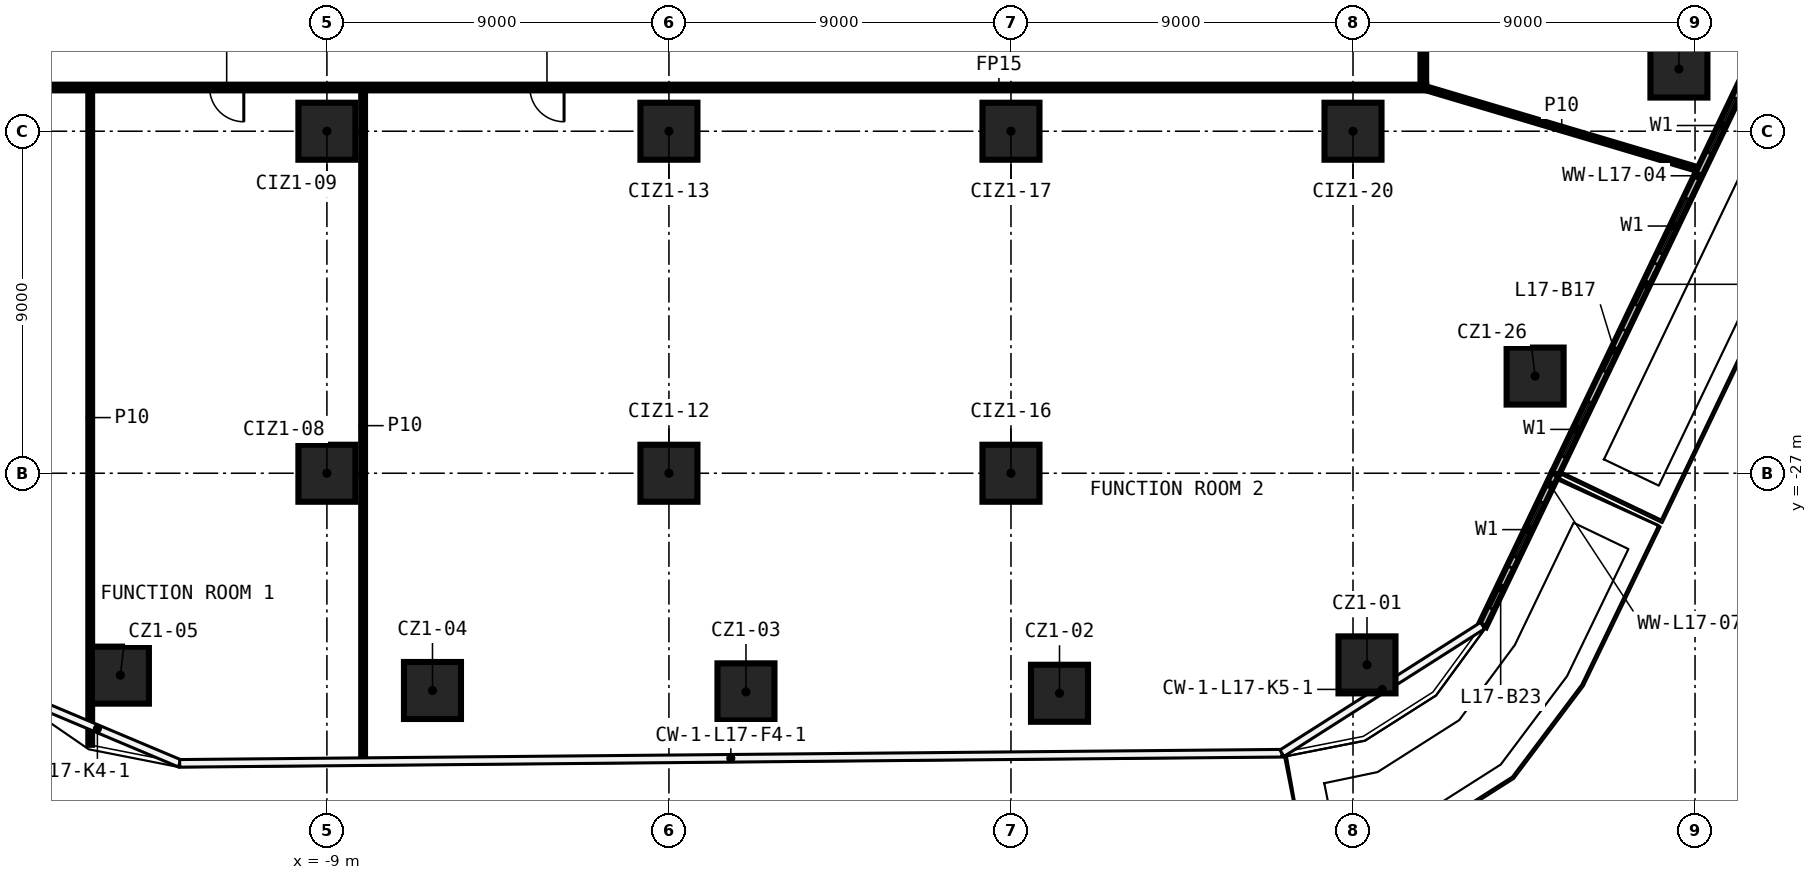
"""IFC4 building model, lengths in metres.
Left out: names, types, materials, properties, quantities, classifications, styles, units other than length and angle.
Written with IfcOpenShell. Run it as: python <this file> out.ifc"""

import sys

from ifc_helpers import new_model, si_unit, direction, frame, frame_2d, origin, origin_2d, place, context, subcontext, project, spatial, rectangle, extrude, element, fill, save


model = new_model("IFC4")
c1 = context("Model", 3, precision=1e-05, world=origin(), true_north=direction((0.0, 1.0)))
c2 = subcontext(c1, "Body", "Model", "MODEL_VIEW")
j1 = project(units=[si_unit("LENGTHUNIT", "METRE"), si_unit("PLANEANGLEUNIT", "RADIAN")], contexts=[c1])
p1 = place(None, origin())
s1 = spatial("IfcSite", under=j1, at=p1, CompositionType="ELEMENT")
p2 = place(p1, origin())
s2 = spatial("IfcBuilding", under=s1, at=p2, CompositionType="ELEMENT")
p3 = place(p2, frame((0.0, 0.0, 84.7)))
s3 = spatial("IfcBuildingStorey", under=s2, at=p3, CompositionType="ELEMENT", Elevation=84.7)
for number, where, z_axis, x_axis in (
    (1, (18.368, -32.043, 0.0), (0.0, 0.0, 1.0), (1.0, 0.0, 0.0)),
    (2, (10.277, -32.79, 0.0), (0.0, 0.0, 1.0), (1.0, 0.0, 0.0)),
    (3, (2.027, -32.753, 0.0), (0.0, 0.0, 1.0), (1.0, 0.0, 0.0)),
    (4, (-6.222, -32.717, 0.0), (0.0, 0.0, 1.0), (1.0, 0.0, 0.0)),
    (5, (-14.434, -32.313, 0.0), (0.0, 0.0, 1.0), (1.0, 0.0, 0.0)),
    (6, (26.576, -16.364, 0.0), (0.0, 0.0, 1.0), (1.0, 0.0, 0.0)),
    (7, (22.792, -24.443, 0.0), (0.0, 0.0, 1.0), (1.0, 0.0, 0.0)),
    (8, (-9.0, -27.0, 0.0), (0.0, 0.0, 1.0), (1.0, 0.0, 0.0)),
    (9, (-9.0, -18.0, 0.0), (0.0, 0.0, 1.0), (1.0, 0.0, 0.0)),
    (10, (0.0, -27.0, 0.0), (0.0, 0.0, 1.0), (1.0, 0.0, 0.0)),
    (11, (0.0, -18.0, 0.0), (0.0, 0.0, 1.0), (1.0, 0.0, 0.0)),
    (12, (9.0, -27.0, 0.0), (0.0, 0.0, 1.0), (1.0, 0.0, 0.0)),
    (13, (9.0, -18.0, 0.0), (0.0, 0.0, 1.0), (1.0, 0.0, 0.0)),
    (14, (18.0, -18.0, 0.0), (0.0, 0.0, 1.0), (1.0, 0.0, 0.0)),
):
    element("IfcColumn", number, at=place(p3, frame(where, z_axis=z_axis, x_axis=x_axis)), inside=s3, PredefinedType="COLUMN", context=c2, shape_type="SweptSolid", body=[
        extrude(rectangle(XDim=1.5, YDim=1.5, at=origin_2d()), origin(), (0.0, 0.0, 1.0), 3.9),
    ])
p4 = place(p3, frame((19.925, -16.85, 0.0), z_axis=(0.0, 0.0, 1.0), x_axis=(-1.0, 0.0, 0.0)))
e15 = element("IfcWall", 15, at=p4, inside=s3, PredefinedType="PARTITIONING", context=c2, shape_type="SweptSolid", body=[
    extrude(rectangle(XDim=39.85, YDim=0.15, at=frame_2d((19.925, 0.0))), origin(), (0.0, 0.0, 1.0), 3.9),
])
p5 = place(p4, frame((31.112, 0.0, 0.0)))
e16 = element("IfcOpeningElement", 16, at=p5, cuts=e15, PredefinedType="OPENING", context=c2, shape_type="SweptSolid", body=[
    extrude(rectangle(XDim=0.9, YDim=2.1, at=frame_2d((0.45, 1.05))), frame((0.0, 0.085, 0.0), z_axis=(0.0, -1.0, 0.0), x_axis=(1.0, 0.0, 0.0)), (0.0, 0.0, 1.0), 0.17),
])
p6 = place(p4, frame((22.684, 0.0, 0.0)))
e17 = element("IfcOpeningElement", 17, at=p6, cuts=e15, PredefinedType="OPENING", context=c2, shape_type="SweptSolid", body=[
    extrude(rectangle(XDim=0.9, YDim=2.1, at=frame_2d((0.45, 1.05))), frame((0.0, 0.085, 0.0), z_axis=(0.0, -1.0, 0.0), x_axis=(1.0, 0.0, 0.0)), (0.0, 0.0, 1.0), 0.17),
])
p7 = place(p3, frame((19.85, 16.775, 0.0), z_axis=(0.0, 0.0, 1.0), x_axis=(0.0, -1.0, 0.0)))
e18 = element("IfcWall", 18, at=p7, inside=s3, PredefinedType="PARTITIONING", context=c2, shape_type="SweptSolid", body=[
    extrude(rectangle(XDim=33.55, YDim=0.15, at=frame_2d((16.775, 0.0))), origin(), (0.0, 0.0, 1.0), 3.9),
])
p8 = place(p7, frame((30.262, 0.0, 0.0)))
e19 = element("IfcOpeningElement", 19, at=p8, cuts=e18, PredefinedType="OPENING", context=c2, shape_type="SweptSolid", body=[
    extrude(rectangle(XDim=0.9, YDim=2.1, at=frame_2d((0.45, 1.05))), frame((0.0, 0.085, 0.0), z_axis=(0.0, -1.0, 0.0), x_axis=(1.0, 0.0, 0.0)), (0.0, 0.0, 1.0), 0.17),
])
p9 = place(p7, frame((21.352, 0.0, 0.0)))
e20 = element("IfcOpeningElement", 20, at=p9, cuts=e18, PredefinedType="OPENING", context=c2, shape_type="SweptSolid", body=[
    extrude(rectangle(XDim=0.9, YDim=2.1, at=frame_2d((0.45, 1.05))), frame((0.0, 0.085, 0.0), z_axis=(0.0, -1.0, 0.0), x_axis=(1.0, 0.0, 0.0)), (0.0, 0.0, 1.0), 0.17),
])
p10 = place(p3, frame((-8.047, -34.57, 0.0), z_axis=(0.0, 0.0, 1.0), x_axis=(0.0, 1.0, 0.0)))
e21 = element("IfcWall", 21, at=p10, inside=s3, PredefinedType="PARTITIONING", context=c2, shape_type="SweptSolid", body=[
    extrude(rectangle(XDim=17.645, YDim=0.1, at=frame_2d((8.823, 0.0))), origin(), (0.0, 0.0, 1.0), 3.9),
])
p11 = place(p3, frame((-15.228, -34.146, 0.0), z_axis=(0.0, 0.0, 1.0), x_axis=(0.0, 1.0, 0.0)))
e22 = element("IfcWall", 22, at=p11, inside=s3, PredefinedType="PARTITIONING", context=c2, shape_type="SweptSolid", body=[
    extrude(rectangle(XDim=17.221, YDim=0.1, at=frame_2d((8.61, 0.0))), origin(), (0.0, 0.0, 1.0), 3.9),
])
p12 = place(p3, frame((19.85, -16.85, 0.0), z_axis=(0.0, 0.0, 1.0), x_axis=(0.958526393987, -0.285003775467, 0.0)))
e23 = element("IfcWall", 23, at=p12, inside=s3, PredefinedType="PARTITIONING", context=c2, shape_type="SweptSolid", body=[
    extrude(rectangle(XDim=7.599, YDim=0.1, at=frame_2d((3.8, 0.0))), origin(), (0.0, 0.0, 1.0), 3.9),
])
p13 = place(p3, frame((23.322, -27.019, 0.0), z_axis=(0.0, 0.0, 1.0), x_axis=(0.432099655508, 0.901825863296, 0.0)))
e24 = element("IfcWall", 24, at=p13, inside=s3, PredefinedType="SOLIDWALL", context=c2, shape_type="SweptSolid", body=[
    extrude(rectangle(XDim=26.603, YDim=0.2, at=frame_2d((13.302, 0.0))), origin(), (0.0, 0.0, 1.0), 3.9),
])
p14 = place(p13, frame((0.5, 0.0, 0.6)))
e25 = element("IfcOpeningElement", 25, at=p14, cuts=e24, PredefinedType="OPENING", context=c2, shape_type="SweptSolid", body=[
    extrude(rectangle(XDim=1.6, YDim=2.4, at=frame_2d((0.8, 1.2))), frame((0.0, 0.11, 0.0), z_axis=(0.0, -1.0, 0.0), x_axis=(1.0, 0.0, 0.0)), (0.0, 0.0, 1.0), 0.22),
])
p15 = place(p13, frame((3.0, 0.0, 0.0)))
e26 = element("IfcOpeningElement", 26, at=p15, cuts=e24, PredefinedType="OPENING", context=c2, shape_type="SweptSolid", body=[
    extrude(rectangle(XDim=1.2, YDim=2.4, at=frame_2d((0.6, 1.2))), frame((0.0, 0.11, 0.0), z_axis=(0.0, -1.0, 0.0), x_axis=(1.0, 0.0, 0.0)), (0.0, 0.0, 1.0), 0.22),
])
p16 = place(p13, frame((6.434, 0.0, 0.6)))
e27 = element("IfcOpeningElement", 27, at=p16, cuts=e24, PredefinedType="OPENING", context=c2, shape_type="SweptSolid", body=[
    extrude(rectangle(XDim=1.6, YDim=2.4, at=frame_2d((0.8, 1.2))), frame((0.0, 0.11, 0.0), z_axis=(0.0, -1.0, 0.0), x_axis=(1.0, 0.0, 0.0)), (0.0, 0.0, 1.0), 0.22),
])
p17 = place(p13, frame((4.934, 0.0, 0.0)))
e28 = element("IfcOpeningElement", 28, at=p17, cuts=e24, PredefinedType="OPENING", context=c2, shape_type="SweptSolid", body=[
    extrude(rectangle(XDim=1.2, YDim=2.4, at=frame_2d((0.6, 1.2))), frame((0.0, 0.11, 0.0), z_axis=(0.0, -1.0, 0.0), x_axis=(1.0, 0.0, 0.0)), (0.0, 0.0, 1.0), 0.22),
])
p18 = place(p13, frame((9.368, 0.0, 0.6)))
e29 = element("IfcOpeningElement", 29, at=p18, cuts=e24, PredefinedType="OPENING", context=c2, shape_type="SweptSolid", body=[
    extrude(rectangle(XDim=1.6, YDim=2.4, at=frame_2d((0.8, 1.2))), frame((0.0, 0.11, 0.0), z_axis=(0.0, -1.0, 0.0), x_axis=(1.0, 0.0, 0.0)), (0.0, 0.0, 1.0), 0.22),
])
p19 = place(p13, frame((11.868, 0.0, 0.0)))
e30 = element("IfcOpeningElement", 30, at=p19, cuts=e24, PredefinedType="OPENING", context=c2, shape_type="SweptSolid", body=[
    extrude(rectangle(XDim=1.2, YDim=2.4, at=frame_2d((0.6, 1.2))), frame((0.0, 0.11, 0.0), z_axis=(0.0, -1.0, 0.0), x_axis=(1.0, 0.0, 0.0)), (0.0, 0.0, 1.0), 0.22),
])
p20 = place(p13, frame((15.301, 0.0, 0.6)))
e31 = element("IfcOpeningElement", 31, at=p20, cuts=e24, PredefinedType="OPENING", context=c2, shape_type="SweptSolid", body=[
    extrude(rectangle(XDim=1.6, YDim=2.4, at=frame_2d((0.8, 1.2))), frame((0.0, 0.11, 0.0), z_axis=(0.0, -1.0, 0.0), x_axis=(1.0, 0.0, 0.0)), (0.0, 0.0, 1.0), 0.22),
])
p21 = place(p13, frame((13.801, 0.0, 0.0)))
e32 = element("IfcOpeningElement", 32, at=p21, cuts=e24, PredefinedType="OPENING", context=c2, shape_type="SweptSolid", body=[
    extrude(rectangle(XDim=1.2, YDim=2.4, at=frame_2d((0.6, 1.2))), frame((0.0, 0.11, 0.0), z_axis=(0.0, -1.0, 0.0), x_axis=(1.0, 0.0, 0.0)), (0.0, 0.0, 1.0), 0.22),
])
p22 = place(p13, frame((19.735, 0.0, 0.6)))
e33 = element("IfcOpeningElement", 33, at=p22, cuts=e24, PredefinedType="OPENING", context=c2, shape_type="SweptSolid", body=[
    extrude(rectangle(XDim=1.6, YDim=2.4, at=frame_2d((0.8, 1.2))), frame((0.0, 0.11, 0.0), z_axis=(0.0, -1.0, 0.0), x_axis=(1.0, 0.0, 0.0)), (0.0, 0.0, 1.0), 0.22),
])
p23 = place(p13, frame((18.035, 0.0, 0.0)))
e34 = element("IfcOpeningElement", 34, at=p23, cuts=e24, PredefinedType="OPENING", context=c2, shape_type="SweptSolid", body=[
    extrude(rectangle(XDim=1.2, YDim=2.4, at=frame_2d((0.6, 1.2))), frame((0.0, 0.11, 0.0), z_axis=(0.0, -1.0, 0.0), x_axis=(1.0, 0.0, 0.0)), (0.0, 0.0, 1.0), 0.22),
])
p24 = place(p13, frame((24.169, 0.0, 0.6)))
e35 = element("IfcOpeningElement", 35, at=p24, cuts=e24, PredefinedType="OPENING", context=c2, shape_type="SweptSolid", body=[
    extrude(rectangle(XDim=1.6, YDim=2.4, at=frame_2d((0.8, 1.2))), frame((0.0, 0.11, 0.0), z_axis=(0.0, -1.0, 0.0), x_axis=(1.0, 0.0, 0.0)), (0.0, 0.0, 1.0), 0.22),
])
p25 = place(p13, frame((22.669, 0.0, 0.0)))
e36 = element("IfcOpeningElement", 36, at=p25, cuts=e24, PredefinedType="OPENING", context=c2, shape_type="SweptSolid", body=[
    extrude(rectangle(XDim=1.2, YDim=2.4, at=frame_2d((0.6, 1.2))), frame((0.0, 0.11, 0.0), z_axis=(0.0, -1.0, 0.0), x_axis=(1.0, 0.0, 0.0)), (0.0, 0.0, 1.0), 0.22),
])
p26 = place(p3, frame((21.41, -31.009, 0.0), z_axis=(0.0, 0.0, 1.0), x_axis=(0.432074367005, 0.90183797956, 0.0)))
e37 = element("IfcWall", 37, at=p26, inside=s3, PredefinedType="SOLIDWALL", context=c2, shape_type="SweptSolid", body=[
    extrude(rectangle(XDim=4.424, YDim=0.2, at=frame_2d((2.212, 0.0))), origin(), (0.0, 0.0, 1.0), 3.9),
])
p27 = place(p26, frame((2.0, 0.0, 0.6)))
e38 = element("IfcOpeningElement", 38, at=p27, cuts=e37, PredefinedType="OPENING", context=c2, shape_type="SweptSolid", body=[
    extrude(rectangle(XDim=1.6, YDim=2.4, at=frame_2d((0.8, 1.2))), frame((0.0, 0.11, 0.0), z_axis=(0.0, -1.0, 0.0), x_axis=(1.0, 0.0, 0.0)), (0.0, 0.0, 1.0), 0.22),
])
p28 = place(p26, frame((0.5, 0.0, 0.0)))
e39 = element("IfcOpeningElement", 39, at=p28, cuts=e37, PredefinedType="OPENING", context=c2, shape_type="SweptSolid", body=[
    extrude(rectangle(XDim=1.2, YDim=2.4, at=frame_2d((0.6, 1.2))), frame((0.0, 0.11, 0.0), z_axis=(0.0, -1.0, 0.0), x_axis=(1.0, 0.0, 0.0)), (0.0, 0.0, 1.0), 0.22),
])
p29 = place(p5, origin())
e40 = element("IfcDoor", 40, at=p29, inside=s3, OperationType="SINGLE_SWING_RIGHT", PredefinedType="DOOR", context=c2, shape_type="SweptSolid", body=[
    extrude(rectangle(XDim=0.9, YDim=2.1, at=frame_2d((0.45, 1.05))), frame((0.0, 0.025, 0.0), z_axis=(0.0, -1.0, 0.0), x_axis=(1.0, 0.0, 0.0)), (0.0, 0.0, 1.0), 0.05),
])
fill(e16, e40)
p30 = place(p6, origin())
e41 = element("IfcDoor", 41, at=p30, inside=s3, OperationType="SINGLE_SWING_LEFT", PredefinedType="DOOR", context=c2, shape_type="SweptSolid", body=[
    extrude(rectangle(XDim=0.9, YDim=2.1, at=frame_2d((0.45, 1.05))), frame((0.0, 0.025, 0.0), z_axis=(0.0, -1.0, 0.0), x_axis=(1.0, 0.0, 0.0)), (0.0, 0.0, 1.0), 0.05),
])
fill(e17, e41)
p31 = place(p14, origin())
e42 = element("IfcWindow", 42, at=p31, inside=s3, PartitioningType="SINGLE_PANEL", PredefinedType="WINDOW", context=c2, shape_type="SweptSolid", body=[
    extrude(rectangle(XDim=1.6, YDim=2.4, at=frame_2d((0.8, 1.2))), frame((0.0, 0.03, 0.0), z_axis=(0.0, -1.0, 0.0), x_axis=(1.0, 0.0, 0.0)), (0.0, 0.0, 1.0), 0.06),
])
fill(e25, e42)
p32 = place(p15, origin())
e43 = element("IfcDoor", 43, at=p32, inside=s3, OperationType="SLIDING_TO_LEFT", PredefinedType="DOOR", context=c2, shape_type="SweptSolid", body=[
    extrude(rectangle(XDim=1.2, YDim=2.4, at=frame_2d((0.6, 1.2))), frame((0.0, 0.025, 0.0), z_axis=(0.0, -1.0, 0.0), x_axis=(1.0, 0.0, 0.0)), (0.0, 0.0, 1.0), 0.05),
])
fill(e26, e43)
p33 = place(p16, origin())
e44 = element("IfcWindow", 44, at=p33, inside=s3, PartitioningType="SINGLE_PANEL", PredefinedType="WINDOW", context=c2, shape_type="SweptSolid", body=[
    extrude(rectangle(XDim=1.6, YDim=2.4, at=frame_2d((0.8, 1.2))), frame((0.0, 0.03, 0.0), z_axis=(0.0, -1.0, 0.0), x_axis=(1.0, 0.0, 0.0)), (0.0, 0.0, 1.0), 0.06),
])
fill(e27, e44)
p34 = place(p17, origin())
e45 = element("IfcDoor", 45, at=p34, inside=s3, OperationType="SLIDING_TO_LEFT", PredefinedType="DOOR", context=c2, shape_type="SweptSolid", body=[
    extrude(rectangle(XDim=1.2, YDim=2.4, at=frame_2d((0.6, 1.2))), frame((0.0, 0.025, 0.0), z_axis=(0.0, -1.0, 0.0), x_axis=(1.0, 0.0, 0.0)), (0.0, 0.0, 1.0), 0.05),
])
fill(e28, e45)
p35 = place(p18, origin())
e46 = element("IfcWindow", 46, at=p35, inside=s3, PartitioningType="SINGLE_PANEL", PredefinedType="WINDOW", context=c2, shape_type="SweptSolid", body=[
    extrude(rectangle(XDim=1.6, YDim=2.4, at=frame_2d((0.8, 1.2))), frame((0.0, 0.03, 0.0), z_axis=(0.0, -1.0, 0.0), x_axis=(1.0, 0.0, 0.0)), (0.0, 0.0, 1.0), 0.06),
])
fill(e29, e46)
p36 = place(p27, origin())
e47 = element("IfcWindow", 47, at=p36, inside=s3, PartitioningType="SINGLE_PANEL", PredefinedType="WINDOW", context=c2, shape_type="SweptSolid", body=[
    extrude(rectangle(XDim=1.6, YDim=2.4, at=frame_2d((0.8, 1.2))), frame((0.0, 0.03, 0.0), z_axis=(0.0, -1.0, 0.0), x_axis=(1.0, 0.0, 0.0)), (0.0, 0.0, 1.0), 0.06),
])
fill(e38, e47)
p37 = place(p28, origin())
e48 = element("IfcDoor", 48, at=p37, inside=s3, OperationType="SLIDING_TO_LEFT", PredefinedType="DOOR", context=c2, shape_type="SweptSolid", body=[
    extrude(rectangle(XDim=1.2, YDim=2.4, at=frame_2d((0.6, 1.2))), frame((0.0, 0.025, 0.0), z_axis=(0.0, -1.0, 0.0), x_axis=(1.0, 0.0, 0.0)), (0.0, 0.0, 1.0), 0.05),
])
fill(e39, e48)
save(model, sys.argv[1])
